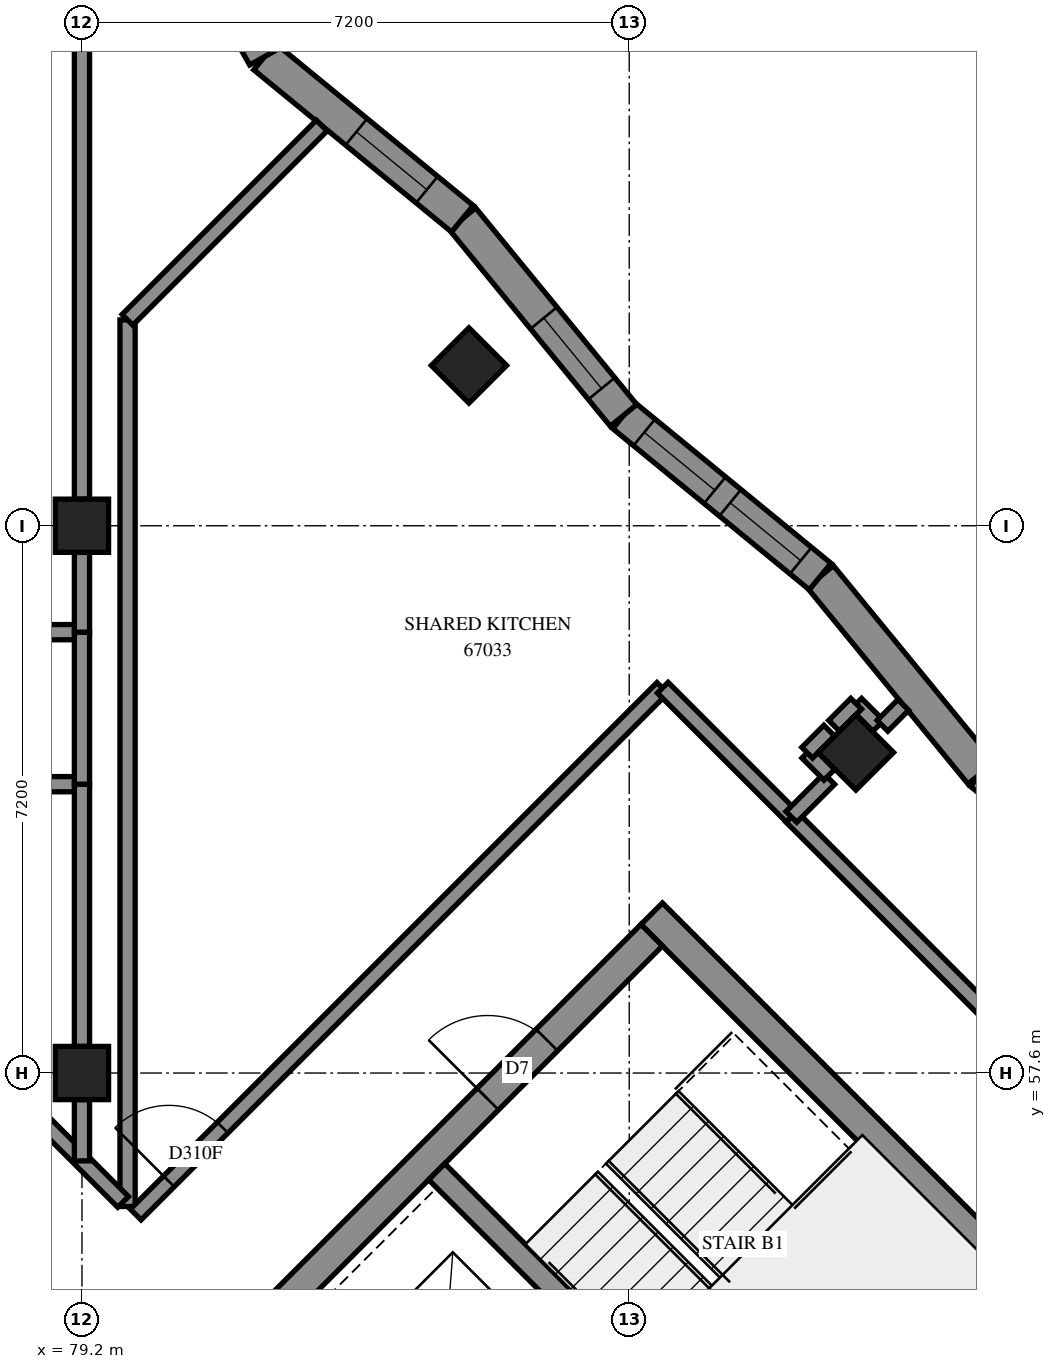
"""IFC4 building model, lengths in metres.
Left out: names, types, materials, properties, quantities, classifications, styles, units other than length and angle.
Written with IfcOpenShell. Run it as: python <this file> out.ifc"""

import sys

from ifc_helpers import new_model, si_unit, direction, frame, frame_2d, origin, origin_2d, place, context, subcontext, project, spatial, polyline, rectangle, outline, extrude, element, fill, save


model = new_model("IFC4")
c1 = context("Model", 3, precision=1e-05, world=origin(), true_north=direction((0.0, 1.0)))
c2 = subcontext(c1, "Body", "Model", "MODEL_VIEW")
j1 = project(units=[si_unit("LENGTHUNIT", "METRE"), si_unit("PLANEANGLEUNIT", "RADIAN")], contexts=[c1])
p1 = place(None, origin())
s1 = spatial("IfcSite", under=j1, at=p1, CompositionType="ELEMENT")
p2 = place(p1, origin())
s2 = spatial("IfcBuilding", under=s1, at=p2, CompositionType="ELEMENT")
p3 = place(p2, frame((0.0, 0.0, 247.2)))
s3 = spatial("IfcBuildingStorey", under=s2, at=p3, CompositionType="ELEMENT", Elevation=247.2)
for number, where, z_axis, x_axis in (
    (1, (79.2, 57.6, 0.0), (0.0, 0.0, 1.0), (1.0, 0.0, 0.0)),
    (2, (79.2, 64.8, 0.0), (0.0, 0.0, 1.0), (1.0, 0.0, 0.0)),
    (3, (84.291, 66.909, 0.0), (0.0, 0.0, 1.0), (0.707, -0.707, 0.0)),
    (4, (89.382, 61.818, 0.0), (0.0, 0.0, 1.0), (0.707, -0.707, 0.0)),
):
    element("IfcColumn", number, at=place(p3, frame(where, z_axis=z_axis, x_axis=x_axis)), inside=s3, PredefinedType="COLUMN", context=c2, shape_type="SweptSolid", body=[
        extrude(rectangle(XDim=0.7, YDim=0.7, at=origin_2d()), origin(), (0.0, 0.0, 1.0), 3.1),
    ])
p4 = place(p3, frame((86.695, 59.696, -0.3), z_axis=(0.0, 0.0, 1.0), x_axis=(0.7071100706, -0.7071034917, 0.0)))
e5 = element("IfcWall", 5, at=p4, inside=s3, PredefinedType="SHEAR", context=c2, shape_type="SweptSolid", body=[
    extrude(rectangle(XDim=15.2, YDim=0.4, at=frame_2d((7.6, 0.0))), origin(), (0.0, 0.0, 1.0), 2.7),
])
p5 = place(p4, frame((10.4, 0.0, 0.3)))
e6 = element("IfcOpeningElement", 6, at=p5, cuts=e5, PredefinedType="OPENING", context=c2, shape_type="SweptSolid", body=[
    extrude(rectangle(XDim=0.8, YDim=2.1, at=frame_2d((0.4, 1.05))), frame((0.0, 0.21, 0.0), z_axis=(0.0, -1.0, 0.0), x_axis=(1.0, 0.0, 0.0)), (0.0, 0.0, 1.0), 0.42),
])
p6 = place(p3, frame((76.513, 49.231, -0.3), z_axis=(0.0, 0.0, 1.0), x_axis=(0.7071067812, 0.7071067812, 0.0)))
e7 = element("IfcWall", 7, at=p6, inside=s3, PredefinedType="SHEAR", context=c2, shape_type="SweptSolid", body=[
    extrude(rectangle(XDim=14.4, YDim=0.4, at=frame_2d((7.2, 0.0))), origin(), (0.0, 0.0, 1.0), 2.7),
])
p7 = place(p6, frame((4.55, 0.0, 0.3)))
e8 = element("IfcOpeningElement", 8, at=p7, cuts=e7, PredefinedType="OPENING", context=c2, shape_type="SweptSolid", body=[
    extrude(rectangle(XDim=1.1, YDim=2.1, at=frame_2d((0.55, 1.05))), frame((0.0, 0.21, 0.0), z_axis=(0.0, -1.0, 0.0), x_axis=(1.0, 0.0, 0.0)), (0.0, 0.0, 1.0), 0.42),
])
p8 = place(p6, frame((11.35, 0.0, 0.3)))
e9 = element("IfcOpeningElement", 9, at=p8, cuts=e7, PredefinedType="OPENING", context=c2, shape_type="SweptSolid", body=[
    extrude(rectangle(XDim=1.1, YDim=2.1, at=frame_2d((0.55, 1.05))), frame((0.0, 0.21, 0.0), z_axis=(0.0, -1.0, 0.0), x_axis=(1.0, 0.0, 0.0)), (0.0, 0.0, 1.0), 0.42),
])
p9 = place(p3, frame((83.867, 56.302, 0.0), z_axis=(0.0, 0.0, 1.0), x_axis=(0.7071137256, -0.7070998367, 0.0)))
e10 = element("IfcWall", 10, at=p9, inside=s3, PredefinedType="SOLIDWALL", context=c2, shape_type="SweptSolid", body=[
    extrude(rectangle(XDim=7.2, YDim=0.3, at=frame_2d((3.6, 0.0))), origin(), (0.0, 0.0, 1.0), 3.1),
])
p10 = place(p3, frame((93.619, 59.425, 0.0), z_axis=(0.0, 0.0, 1.0), x_axis=(-0.7734134923, 0.6339018614, 0.0)))
e11 = element("IfcWall", 11, at=p10, inside=s3, PredefinedType="SOLIDWALL", context=c2, shape_type="SweptSolid", body=[
    extrude(outline(polyline([(-0.022, -0.225), (3.322, -0.225), (3.367, 0.225), (0.022, 0.225), (-0.022, -0.225)])), origin(), (0.0, 0.0, 1.0), 3.1),
])
p11 = place(p10, frame((1.518, 0.0, 0.45)))
e12 = element("IfcOpeningElement", 12, at=p11, cuts=e11, PredefinedType="OPENING", context=c2, shape_type="SweptSolid", body=[
    extrude(rectangle(XDim=1.2, YDim=2.55, at=frame_2d((0.6, 1.275))), frame((0.0, 0.235, 0.0), z_axis=(0.0, -1.0, 0.0), x_axis=(1.0, 0.0, 0.0)), (0.0, 0.0, 1.0), 0.47),
])
p12 = place(p3, frame((91.032, 61.545, 0.0), z_axis=(0.0, 0.0, 1.0), x_axis=(-0.6339018614, 0.7734134923, 0.0)))
e13 = element("IfcWall", 13, at=p12, inside=s3, PredefinedType="SOLIDWALL", context=c2, shape_type="SweptSolid", body=[
    extrude(outline(polyline([(0.022, -0.225), (3.367, -0.225), (3.322, 0.225), (-0.022, 0.225), (0.022, -0.225)])), origin(), (0.0, 0.0, 1.0), 3.1),
])
p13 = place(p3, frame((88.912, 64.132, 0.0), z_axis=(0.0, 0.0, 1.0), x_axis=(-0.7734134923, 0.6339018614, 0.0)))
e14 = element("IfcWall", 14, at=p13, inside=s3, PredefinedType="SOLIDWALL", context=c2, shape_type="SweptSolid", body=[
    extrude(outline(polyline([(-0.022, -0.225), (3.322, -0.225), (3.367, 0.225), (0.022, 0.225), (-0.022, -0.225)])), origin(), (0.0, 0.0, 1.0), 3.1),
])
p14 = place(p13, frame((0.331, 0.0, 0.45)))
e15 = element("IfcOpeningElement", 15, at=p14, cuts=e14, PredefinedType="OPENING", context=c2, shape_type="SweptSolid", body=[
    extrude(rectangle(XDim=1.2, YDim=2.55, at=frame_2d((0.6, 1.275))), frame((0.0, 0.235, 0.0), z_axis=(0.0, -1.0, 0.0), x_axis=(1.0, 0.0, 0.0)), (0.0, 0.0, 1.0), 0.47),
])
p15 = place(p13, frame((1.792, 0.0, 0.45)))
e16 = element("IfcOpeningElement", 16, at=p15, cuts=e14, PredefinedType="OPENING", context=c2, shape_type="SweptSolid", body=[
    extrude(rectangle(XDim=1.2, YDim=2.55, at=frame_2d((0.6, 1.275))), frame((0.0, 0.235, 0.0), z_axis=(0.0, -1.0, 0.0), x_axis=(1.0, 0.0, 0.0)), (0.0, 0.0, 1.0), 0.47),
])
p16 = place(p3, frame((86.325, 66.252, 0.0), z_axis=(0.0, 0.0, 1.0), x_axis=(-0.6339018614, 0.7734134923, 0.0)))
e17 = element("IfcWall", 17, at=p16, inside=s3, PredefinedType="SOLIDWALL", context=c2, shape_type="SweptSolid", body=[
    extrude(outline(polyline([(0.022, -0.225), (3.367, -0.225), (3.322, 0.225), (-0.022, 0.225), (0.022, -0.225)])), origin(), (0.0, 0.0, 1.0), 3.1),
])
p17 = place(p16, frame((0.456, 0.0, 0.45)))
e18 = element("IfcOpeningElement", 18, at=p17, cuts=e17, PredefinedType="OPENING", context=c2, shape_type="SweptSolid", body=[
    extrude(rectangle(XDim=1.2, YDim=2.55, at=frame_2d((0.6, 1.275))), frame((0.0, 0.235, 0.0), z_axis=(0.0, -1.0, 0.0), x_axis=(1.0, 0.0, 0.0)), (0.0, 0.0, 1.0), 0.47),
])
p18 = place(p3, frame((84.205, 68.839, 0.0), z_axis=(0.0, 0.0, 1.0), x_axis=(-0.7734286531, 0.6338833635, 0.0)))
e19 = element("IfcWall", 19, at=p18, inside=s3, PredefinedType="SOLIDWALL", context=c2, shape_type="SweptSolid", body=[
    extrude(outline(polyline([(-0.022, -0.225), (3.322, -0.225), (3.407, 0.225), (0.022, 0.225), (-0.022, -0.225)])), origin(), (0.0, 0.0, 1.0), 3.1),
])
p19 = place(p18, frame((0.604, 0.0, 0.45)))
e20 = element("IfcOpeningElement", 20, at=p19, cuts=e19, PredefinedType="OPENING", context=c2, shape_type="SweptSolid", body=[
    extrude(rectangle(XDim=1.2, YDim=2.55, at=frame_2d((0.6, 1.275))), frame((0.0, 0.235, 0.0), z_axis=(0.0, -1.0, 0.0), x_axis=(1.0, 0.0, 0.0)), (0.0, 0.0, 1.0), 0.47),
])
p20 = place(p3, frame((81.603, 70.972, 0.0), z_axis=(0.0, 0.0, 1.0), x_axis=(-0.4907277416, 0.8713129654, 0.0)))
e21 = element("IfcWall", 21, at=p20, inside=s3, PredefinedType="SOLIDWALL", context=c2, shape_type="SweptSolid", body=[
    extrude(outline(polyline([(0.042, -0.225), (3.498, -0.225), (3.157, 0.225), (-0.042, 0.225), (0.042, -0.225)])), origin(), (0.0, 0.0, 1.0), 3.1),
])
p21 = place(p20, frame((0.759, 0.0, 0.45)))
e22 = element("IfcOpeningElement", 22, at=p21, cuts=e21, PredefinedType="OPENING", context=c2, shape_type="SweptSolid", body=[
    extrude(rectangle(XDim=1.2, YDim=2.55, at=frame_2d((0.6, 1.275))), frame((0.0, 0.235, 0.0), z_axis=(0.0, -1.0, 0.0), x_axis=(1.0, 0.0, 0.0)), (0.0, 0.0, 1.0), 0.47),
])
p22 = place(p3, frame((79.8, 55.844, 0.0), z_axis=(0.0, 0.0, 1.0), x_axis=(0.0, 1.0, 0.0)))
e23 = element("IfcWall", 23, at=p22, inside=s3, PredefinedType="PARTITIONING", context=c2, shape_type="SweptSolid", body=[
    extrude(rectangle(XDim=11.664, YDim=0.2, at=frame_2d((5.832, 0.0))), origin(), (0.0, 0.0, 1.0), 3.1),
])
p23 = place(p3, frame((79.907, 55.739, 0.0), z_axis=(0.0, 0.0, 1.0), x_axis=(0.7071067812, 0.7071067812, 0.0)))
e24 = element("IfcWall", 24, at=p23, inside=s3, PredefinedType="PARTITIONING", context=c2, shape_type="SweptSolid", body=[
    extrude(rectangle(XDim=9.798, YDim=0.2, at=frame_2d((4.899, 0.0))), origin(), (0.0, 0.0, 1.0), 3.1),
])
p24 = place(p23, frame((0.617, 0.0, 0.0)))
e25 = element("IfcOpeningElement", 25, at=p24, cuts=e24, PredefinedType="OPENING", context=c2, shape_type="SweptSolid", body=[
    extrude(rectangle(XDim=1.0, YDim=2.1, at=frame_2d((0.5, 1.05))), frame((0.0, 0.11, 0.0), z_axis=(0.0, -1.0, 0.0), x_axis=(1.0, 0.0, 0.0)), (0.0, 0.0, 1.0), 0.22),
])
p25 = place(p3, frame((88.535, 60.971, 0.0), z_axis=(0.0, 0.0, 1.0), x_axis=(0.7069678741, -0.707245661, 0.0)))
e26 = element("IfcWall", 26, at=p25, inside=s3, PredefinedType="PARTITIONING", context=c2, shape_type="SweptSolid", body=[
    extrude(rectangle(XDim=7.2, YDim=0.2, at=frame_2d((3.6, 0.0))), origin(), (0.0, 0.0, 1.0), 3.1),
])
p26 = place(p3, frame((79.2, 65.15, 0.0), z_axis=(0.0, 0.0, 1.0), x_axis=(0.0, 1.0, 0.0)))
e27 = element("IfcWall", 27, at=p26, inside=s3, PredefinedType="PARTITIONING", context=c2, shape_type="SweptSolid", body=[
    extrude(rectangle(XDim=6.5, YDim=0.2, at=frame_2d((3.25, 0.0))), origin(), (0.0, 0.0, 1.0), 3.1),
])
p27 = place(p3, frame((74.246, 61.4, 0.0), z_axis=(0.0, 0.0, 1.0), x_axis=(1.0, 0.0, 0.0)))
e28 = element("IfcWall", 28, at=p27, inside=s3, PredefinedType="PARTITIONING", context=c2, shape_type="SweptSolid", body=[
    extrude(rectangle(XDim=4.954, YDim=0.2, at=frame_2d((2.477, 0.0))), origin(), (0.0, 0.0, 1.0), 3.1),
])
p28 = place(p27, frame((1.17, 0.0, 0.0)))
e29 = element("IfcOpeningElement", 29, at=p28, cuts=e28, PredefinedType="OPENING", context=c2, shape_type="SweptSolid", body=[
    extrude(rectangle(XDim=1.0, YDim=2.1, at=frame_2d((0.5, 1.05))), frame((0.0, 0.11, 0.0), z_axis=(0.0, -1.0, 0.0), x_axis=(1.0, 0.0, 0.0)), (0.0, 0.0, 1.0), 0.22),
])
p29 = place(p3, frame((74.402, 63.4, 0.0), z_axis=(0.0, 0.0, 1.0), x_axis=(1.0, 0.0, 0.0)))
e30 = element("IfcWall", 30, at=p29, inside=s3, PredefinedType="PARTITIONING", context=c2, shape_type="SweptSolid", body=[
    extrude(rectangle(XDim=4.798, YDim=0.2, at=frame_2d((2.399, 0.0))), origin(), (0.0, 0.0, 1.0), 3.1),
])
p30 = place(p29, frame((1.766, 0.0, 0.0)))
e31 = element("IfcOpeningElement", 31, at=p30, cuts=e30, PredefinedType="OPENING", context=c2, shape_type="SweptSolid", body=[
    extrude(rectangle(XDim=1.0, YDim=2.1, at=frame_2d((0.5, 1.05))), frame((0.0, 0.11, 0.0), z_axis=(0.0, -1.0, 0.0), x_axis=(1.0, 0.0, 0.0)), (0.0, 0.0, 1.0), 0.22),
])
p31 = place(p3, frame((76.513, 59.131, 0.0), z_axis=(0.0, 0.0, 1.0), x_axis=(0.7073586681, -0.7068548045, 0.0)))
e32 = element("IfcWall", 32, at=p31, inside=s3, PredefinedType="PARTITIONING", context=c2, shape_type="SweptSolid", body=[
    extrude(rectangle(XDim=4.565, YDim=0.2, at=frame_2d((2.282, 0.0))), origin(), (0.0, 0.0, 1.0), 3.1),
])
p32 = place(p3, frame((79.799, 67.509, 0.0), z_axis=(0.0, 0.0, 1.0), x_axis=(0.7070929469, 0.7071206152, 0.0)))
e33 = element("IfcWall", 33, at=p32, inside=s3, PredefinedType="PARTITIONING", context=c2, shape_type="SweptSolid", body=[
    extrude(rectangle(XDim=3.614, YDim=0.2, at=frame_2d((1.807, 0.0))), origin(), (0.0, 0.0, 1.0), 3.1),
])
p33 = place(p3, frame((79.2, 57.95, 0.0), z_axis=(0.0, 0.0, 1.0), x_axis=(0.0, 1.0, 0.0)))
e34 = element("IfcWall", 34, at=p33, inside=s3, PredefinedType="PARTITIONING", context=c2, shape_type="SweptSolid", body=[
    extrude(rectangle(XDim=3.45, YDim=0.2, at=frame_2d((1.725, 0.0))), origin(), (0.0, 0.0, 1.0), 3.1),
])
p34 = place(p3, frame((86.841, 62.669, 0.0), z_axis=(0.0, 0.0, 1.0), x_axis=(0.7071067812, -0.7071067812, 0.0)))
e35 = element("IfcWall", 35, at=p34, inside=s3, PredefinedType="PARTITIONING", context=c2, shape_type="SweptSolid", body=[
    extrude(rectangle(XDim=2.398, YDim=0.2, at=frame_2d((1.199, 0.0))), origin(), (0.0, 0.0, 1.0), 3.1),
])
p35 = place(p3, frame((79.2, 61.4, 0.0), z_axis=(0.0, 0.0, 1.0), x_axis=(0.0, 1.0, 0.0)))
e36 = element("IfcWall", 36, at=p35, inside=s3, PredefinedType="PARTITIONING", context=c2, shape_type="SweptSolid", body=[
    extrude(rectangle(XDim=2.0, YDim=0.2, at=frame_2d((1.0, 0.0))), origin(), (0.0, 0.0, 1.0), 3.1),
])
p36 = place(p3, frame((79.2, 63.4, 0.0), z_axis=(0.0, 0.0, 1.0), x_axis=(0.0, 1.0, 0.0)))
e37 = element("IfcWall", 37, at=p36, inside=s3, PredefinedType="PARTITIONING", context=c2, shape_type="SweptSolid", body=[
    extrude(rectangle(XDim=1.05, YDim=0.2, at=frame_2d((0.525, 0.0))), origin(), (0.0, 0.0, 1.0), 3.1),
])
p37 = place(p3, frame((79.2, 56.444, 0.0), z_axis=(0.0, 0.0, 1.0), x_axis=(0.0, 1.0, 0.0)))
e38 = element("IfcWall", 38, at=p37, inside=s3, PredefinedType="PARTITIONING", context=c2, shape_type="SweptSolid", body=[
    extrude(rectangle(XDim=0.806, YDim=0.2, at=frame_2d((0.403, 0.0))), origin(), (0.0, 0.0, 1.0), 3.1),
])
p38 = place(p3, frame((88.534, 60.971, 0.0), z_axis=(0.0, 0.0, 1.0), x_axis=(0.7071067812, 0.7071067812, 0.0)))
e39 = element("IfcWall", 39, at=p38, inside=s3, PredefinedType="PARTITIONING", context=c2, shape_type="SweptSolid", body=[
    extrude(rectangle(XDim=0.704, YDim=0.2, at=frame_2d((0.352, 0.0))), origin(), (0.0, 0.0, 1.0), 3.1),
])
for number, where, z_axis, x_axis in (
    (40, (88.743, 61.815, 0.0), (0.0, 0.0, 1.0), (0.707, -0.707, 0.0)),
    (41, (89.386, 62.458, 0.0), (0.0, 0.0, 1.0), (0.707, -0.707, 0.0)),
    (42, (88.741, 61.815, 0.0), (0.0, 0.0, 1.0), (0.707, 0.707, 0.0)),
    (43, (89.095, 62.169, 0.0), (0.0, 0.0, 1.0), (0.707, 0.707, 0.0)),
):
    element("IfcWall", number, at=place(p3, frame(where, z_axis=z_axis, x_axis=x_axis)), inside=s3, PredefinedType="PARTITIONING", context=c2, shape_type="SweptSolid", body=[
        extrude(rectangle(XDim=0.41, YDim=0.2, at=frame_2d((0.205, 0.0))), origin(), (0.0, 0.0, 1.0), 3.1),
    ])
p39 = place(p3, frame((89.731, 62.169, 0.0), z_axis=(0.0, 0.0, 1.0), x_axis=(0.7072357329, 0.7069778059, 0.0)))
e44 = element("IfcWall", 44, at=p39, inside=s3, PredefinedType="PARTITIONING", context=c2, shape_type="SweptSolid", body=[
    extrude(rectangle(XDim=0.388, YDim=0.2, at=frame_2d((0.194, 0.0))), origin(), (0.0, 0.0, 1.0), 3.1),
])
p40 = place(p14, origin())
e45 = element("IfcWindow", 45, at=p40, inside=s3, PartitioningType="SINGLE_PANEL", PredefinedType="WINDOW", context=c2, shape_type="SweptSolid", body=[
    extrude(rectangle(XDim=1.2, YDim=2.55, at=frame_2d((0.6, 1.275))), frame((0.0, 0.205, 0.0), z_axis=(0.0, -1.0, 0.0), x_axis=(1.0, 0.0, 0.0)), (0.0, 0.0, 1.0), 0.06),
])
fill(e15, e45)
p41 = place(p15, origin())
e46 = element("IfcWindow", 46, at=p41, inside=s3, PartitioningType="SINGLE_PANEL", PredefinedType="WINDOW", context=c2, shape_type="SweptSolid", body=[
    extrude(rectangle(XDim=1.2, YDim=2.55, at=frame_2d((0.6, 1.275))), frame((0.0, 0.205, 0.0), z_axis=(0.0, -1.0, 0.0), x_axis=(1.0, 0.0, 0.0)), (0.0, 0.0, 1.0), 0.06),
])
fill(e16, e46)
p42 = place(p17, origin())
e47 = element("IfcWindow", 47, at=p42, inside=s3, PartitioningType="SINGLE_PANEL", PredefinedType="WINDOW", context=c2, shape_type="SweptSolid", body=[
    extrude(rectangle(XDim=1.2, YDim=2.55, at=frame_2d((0.6, 1.275))), frame((0.0, 0.205, 0.0), z_axis=(0.0, -1.0, 0.0), x_axis=(1.0, 0.0, 0.0)), (0.0, 0.0, 1.0), 0.06),
])
fill(e18, e47)
p43 = place(p19, origin())
e48 = element("IfcWindow", 48, at=p43, inside=s3, PartitioningType="SINGLE_PANEL", PredefinedType="WINDOW", context=c2, shape_type="SweptSolid", body=[
    extrude(rectangle(XDim=1.2, YDim=2.55, at=frame_2d((0.6, 1.275))), frame((0.0, 0.205, 0.0), z_axis=(0.0, -1.0, 0.0), x_axis=(1.0, 0.0, 0.0)), (0.0, 0.0, 1.0), 0.06),
])
fill(e20, e48)
p44 = place(p8, origin())
e49 = element("IfcDoor", 49, at=p44, inside=s3, OperationType="SINGLE_SWING_LEFT", PredefinedType="DOOR", context=c2, shape_type="SweptSolid", body=[
    extrude(rectangle(XDim=1.1, YDim=2.1, at=frame_2d((0.55, 1.05))), frame((0.0, 0.025, 0.0), z_axis=(0.0, -1.0, 0.0), x_axis=(1.0, 0.0, 0.0)), (0.0, 0.0, 1.0), 0.05),
])
fill(e9, e49)
p45 = place(p24, origin())
e50 = element("IfcDoor", 50, at=p45, inside=s3, OperationType="SINGLE_SWING_RIGHT", PredefinedType="DOOR", context=c2, shape_type="SweptSolid", body=[
    extrude(rectangle(XDim=1.0, YDim=2.1, at=frame_2d((0.5, 1.05))), frame((0.0, 0.025, 0.0), z_axis=(0.0, -1.0, 0.0), x_axis=(1.0, 0.0, 0.0)), (0.0, 0.0, 1.0), 0.05),
])
fill(e25, e50)
save(model, sys.argv[1])
